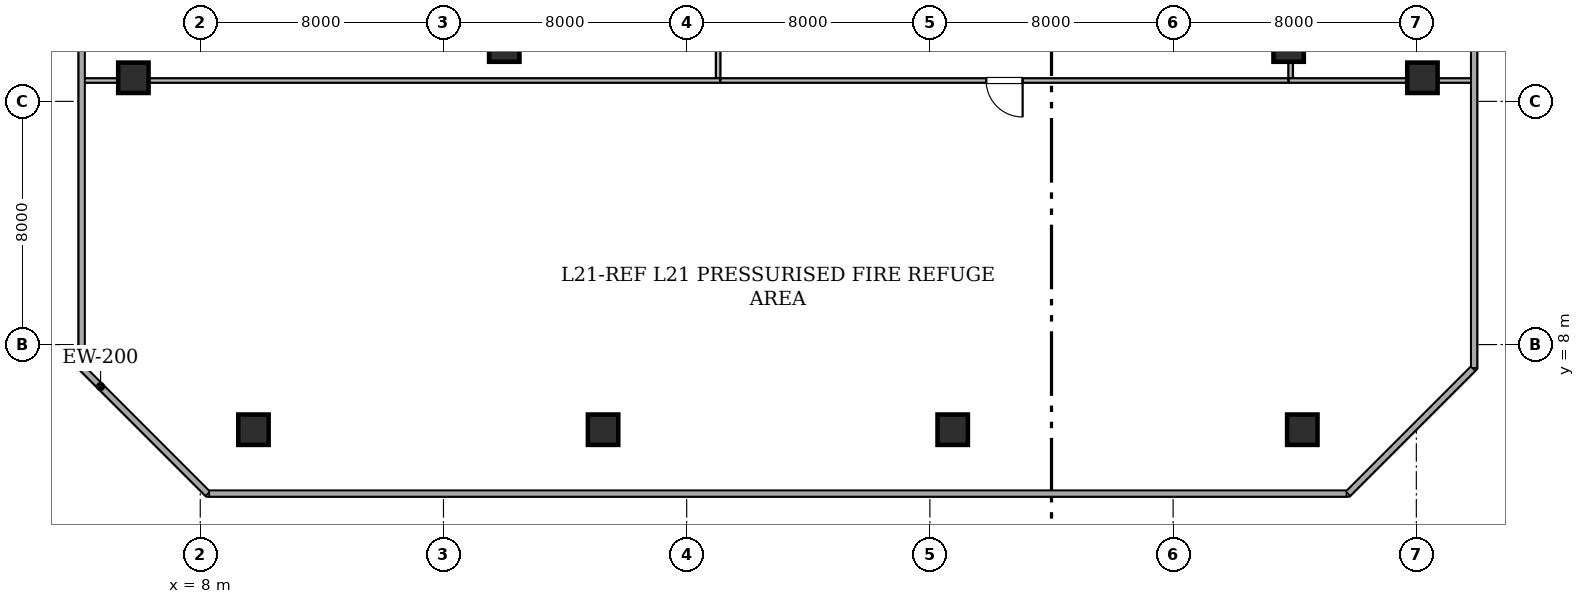
"""IFC4 building model, lengths in metres.
Left out: names, types, materials, properties, quantities, classifications, styles, units other than length and angle.
Written with IfcOpenShell. Run it as: python <this file> out.ifc"""

import sys

from ifc_helpers import new_model, si_unit, direction, frame, frame_2d, origin, origin_2d, place, context, subcontext, project, spatial, rectangle, hollow_rectangle, extrude, element, fill, save


model = new_model("IFC4")
c1 = context("Model", 3, precision=1e-05, world=origin(), true_north=direction((0.0, 1.0)))
c2 = subcontext(c1, "Body", "Model", "MODEL_VIEW")
j1 = project(units=[si_unit("LENGTHUNIT", "METRE"), si_unit("PLANEANGLEUNIT", "RADIAN")], contexts=[c1])
p1 = place(None, origin())
s1 = spatial("IfcSite", under=j1, at=p1, CompositionType="ELEMENT")
p2 = place(p1, origin())
s2 = spatial("IfcBuilding", under=s1, at=p2, CompositionType="ELEMENT")
p3 = place(p2, frame((0.0, 0.0, 84.4)))
s3 = spatial("IfcBuildingStorey", under=s2, at=p3, CompositionType="ELEMENT", Elevation=84.4)
for number, where, z_axis, x_axis in (
    (1, (9.75, 5.2, 0.0), (0.0, 0.0, 1.0), (1.0, 0.0, 0.0)),
    (2, (21.25, 5.2, 0.0), (0.0, 0.0, 1.0), (1.0, 0.0, 0.0)),
    (3, (32.75, 5.2, 0.0), (0.0, 0.0, 1.0), (1.0, 0.0, 0.0)),
    (4, (44.25, 5.2, 0.0), (0.0, 0.0, 1.0), (1.0, 0.0, 0.0)),
    (5, (5.8, 16.775, 0.0), (0.0, 0.0, 1.0), (1.0, 0.0, 0.0)),
    (6, (48.2, 16.775, 0.0), (0.0, 0.0, 1.0), (1.0, 0.0, 0.0)),
):
    element("IfcColumn", number, at=place(p3, frame(where, z_axis=z_axis, x_axis=x_axis)), inside=s3, PredefinedType="COLUMN", context=c2, shape_type="SweptSolid", body=[
        extrude(hollow_rectangle(XDim=1.0, YDim=1.0, WallThickness=0.05, at=origin_2d()), origin(), (0.0, 0.0, 1.0), 5.375),
    ])
p4 = place(p3, frame((18.0, 17.8, 0.0), z_axis=(0.0, 0.0, 1.0), x_axis=(1.0, 0.0, 0.0)))
e7 = element("IfcColumn", 7, at=p4, inside=s3, PredefinedType="COLUMN", context=c2, shape_type="SweptSolid", body=[
    extrude(hollow_rectangle(XDim=1.0, YDim=1.0, WallThickness=0.05, at=origin_2d()), origin(), (0.0, 0.0, 1.0), 5.4),
])
p5 = place(p3, frame((43.8, 17.8, 0.0), z_axis=(0.0, 0.0, 1.0), x_axis=(1.0, 0.0, 0.0)))
e8 = element("IfcColumn", 8, at=p5, inside=s3, PredefinedType="COLUMN", context=c2, shape_type="SweptSolid", body=[
    extrude(hollow_rectangle(XDim=1.0, YDim=1.0, WallThickness=0.05, at=origin_2d()), origin(), (0.0, 0.0, 1.0), 5.375),
])
p6 = place(p3, frame((8.241, 3.1, 0.0), z_axis=(0.0, 0.0, 1.0), x_axis=(-0.707106781187, 0.707106781187, 0.0)))
e9 = element("IfcWall", 9, at=p6, inside=s3, PredefinedType="STANDARD", context=c2, shape_type="SweptSolid", body=[
    extrude(rectangle(XDim=5.856, YDim=0.2, at=frame_2d((2.928, 0.0))), origin(), (0.0, 0.0, 1.0), 1.15),
])
p7 = place(p3, frame((4.1, 7.304, 0.0), z_axis=(0.0, 0.0, 1.0), x_axis=(0.0, 1.0, 0.0)))
e10 = element("IfcWall", 10, at=p7, inside=s3, PredefinedType="STANDARD", context=c2, shape_type="SweptSolid", body=[
    extrude(rectangle(XDim=17.463, YDim=0.2, at=frame_2d((8.731, 0.0))), origin(), (0.0, 0.0, 1.0), 1.15),
])
p8 = place(p3, frame((49.9, 24.717, 0.0), z_axis=(0.0, 0.0, 1.0), x_axis=(0.0, -1.0, 0.0)))
e11 = element("IfcWall", 11, at=p8, inside=s3, PredefinedType="STANDARD", context=c2, shape_type="SweptSolid", body=[
    extrude(rectangle(XDim=17.476, YDim=0.2, at=frame_2d((8.738, 0.0))), origin(), (0.0, 0.0, 1.0), 1.15),
])
p9 = place(p3, frame((49.857, 7.198, 0.0), z_axis=(0.0, 0.0, 1.0), x_axis=(-0.707106781187, -0.707106781187, 0.0)))
e12 = element("IfcWall", 12, at=p9, inside=s3, PredefinedType="STANDARD", context=c2, shape_type="SweptSolid", body=[
    extrude(rectangle(XDim=5.795, YDim=0.2, at=frame_2d((2.898, 0.0))), origin(), (0.0, 0.0, 1.0), 1.15),
])
p10 = place(p3, frame((45.696, 3.1, 0.0), z_axis=(0.0, 0.0, 1.0), x_axis=(-1.0, 0.0, 0.0)))
e13 = element("IfcWall", 13, at=p10, inside=s3, PredefinedType="STANDARD", context=c2, shape_type="SweptSolid", body=[
    extrude(rectangle(XDim=37.393, YDim=0.2, at=frame_2d((18.697, 0.0))), origin(), (0.0, 0.0, 1.0), 1.15),
])
p11 = place(p3, frame((43.8, 16.685, 0.0), z_axis=(0.0, 0.0, 1.0), x_axis=(-1.0, 0.0, 0.0)))
e14 = element("IfcWall", 14, at=p11, inside=s3, PredefinedType="STANDARD", context=c2, shape_type="SweptSolid", body=[
    extrude(rectangle(XDim=18.7, YDim=0.15, at=frame_2d((9.35, 0.0))), origin(), (0.0, 0.0, 1.0), 3.42),
])
p12 = place(p11, frame((8.75, 0.0, 0.0)))
e15 = element("IfcOpeningElement", 15, at=p12, cuts=e14, PredefinedType="OPENING", context=c2, shape_type="SweptSolid", body=[
    extrude(rectangle(XDim=1.2, YDim=2.15, at=frame_2d((0.6, 1.075))), frame((0.0, 0.085, 0.0), z_axis=(0.0, -1.0, 0.0), x_axis=(1.0, 0.0, 0.0)), (0.0, 0.0, 1.0), 0.17),
])
p13 = place(p3, frame((25.035, 16.75, 0.0), z_axis=(0.0, 0.0, 1.0), x_axis=(0.0, 1.0, 0.0)))
e16 = element("IfcWall", 16, at=p13, inside=s3, PredefinedType="STANDARD", context=c2, shape_type="SweptSolid", body=[
    extrude(rectangle(XDim=12.564, YDim=0.15, at=frame_2d((6.282, 0.0))), origin(), (0.0, 0.0, 1.0), 3.42),
])
p14 = place(p13, frame((5.661, 0.0, 0.0)))
e17 = element("IfcOpeningElement", 17, at=p14, cuts=e16, PredefinedType="OPENING", context=c2, shape_type="SweptSolid", body=[
    extrude(rectangle(XDim=1.2, YDim=2.15, at=frame_2d((0.6, 1.075))), frame((0.0, 0.085, 0.0), z_axis=(0.0, -1.0, 0.0), x_axis=(1.0, 0.0, 0.0)), (0.0, 0.0, 1.0), 0.17),
])
p15 = place(p3, frame((43.865, 29.314, 0.0), z_axis=(0.0, 0.0, 1.0), x_axis=(0.0, -1.0, 0.0)))
e18 = element("IfcWall", 18, at=p15, inside=s3, PredefinedType="STANDARD", context=c2, shape_type="SweptSolid", body=[
    extrude(rectangle(XDim=12.564, YDim=0.15, at=frame_2d((6.282, 0.0))), origin(), (0.0, 0.0, 1.0), 3.42),
])
p16 = place(p15, frame((5.703, 0.0, 0.0)))
e19 = element("IfcOpeningElement", 19, at=p16, cuts=e18, PredefinedType="OPENING", context=c2, shape_type="SweptSolid", body=[
    extrude(rectangle(XDim=1.2, YDim=2.15, at=frame_2d((0.6, 1.075))), frame((0.0, 0.085, 0.0), z_axis=(0.0, -1.0, 0.0), x_axis=(1.0, 0.0, 0.0)), (0.0, 0.0, 1.0), 0.17),
])
p17 = place(p3, frame((4.192, 16.685, 0.0), z_axis=(0.0, 0.0, 1.0), x_axis=(1.0, 0.0, 0.0)))
e20 = element("IfcWall", 20, at=p17, inside=s3, PredefinedType="STANDARD", context=c2, shape_type="SweptSolid", body=[
    extrude(rectangle(XDim=20.908, YDim=0.15, at=frame_2d((10.454, 0.0))), origin(), (0.0, 0.0, 1.0), 3.42),
])
p18 = place(p3, frame((43.8, 16.685, 0.0), z_axis=(0.0, 0.0, 1.0), x_axis=(1.0, 0.0, 0.0)))
e21 = element("IfcWall", 21, at=p18, inside=s3, PredefinedType="STANDARD", context=c2, shape_type="SweptSolid", body=[
    extrude(rectangle(XDim=6.008, YDim=0.15, at=frame_2d((3.004, 0.0))), origin(), (0.0, 0.0, 1.0), 3.42),
])
p19 = place(p12, origin())
e22 = element("IfcDoor", 22, at=p19, inside=s3, OperationType="SINGLE_SWING_LEFT", PredefinedType="DOOR", context=c2, shape_type="SweptSolid", body=[
    extrude(rectangle(XDim=1.2, YDim=2.15, at=frame_2d((0.6, 1.075))), frame((0.0, 0.025, 0.0), z_axis=(0.0, -1.0, 0.0), x_axis=(1.0, 0.0, 0.0)), (0.0, 0.0, 1.0), 0.05),
])
fill(e15, e22)
save(model, sys.argv[1])
